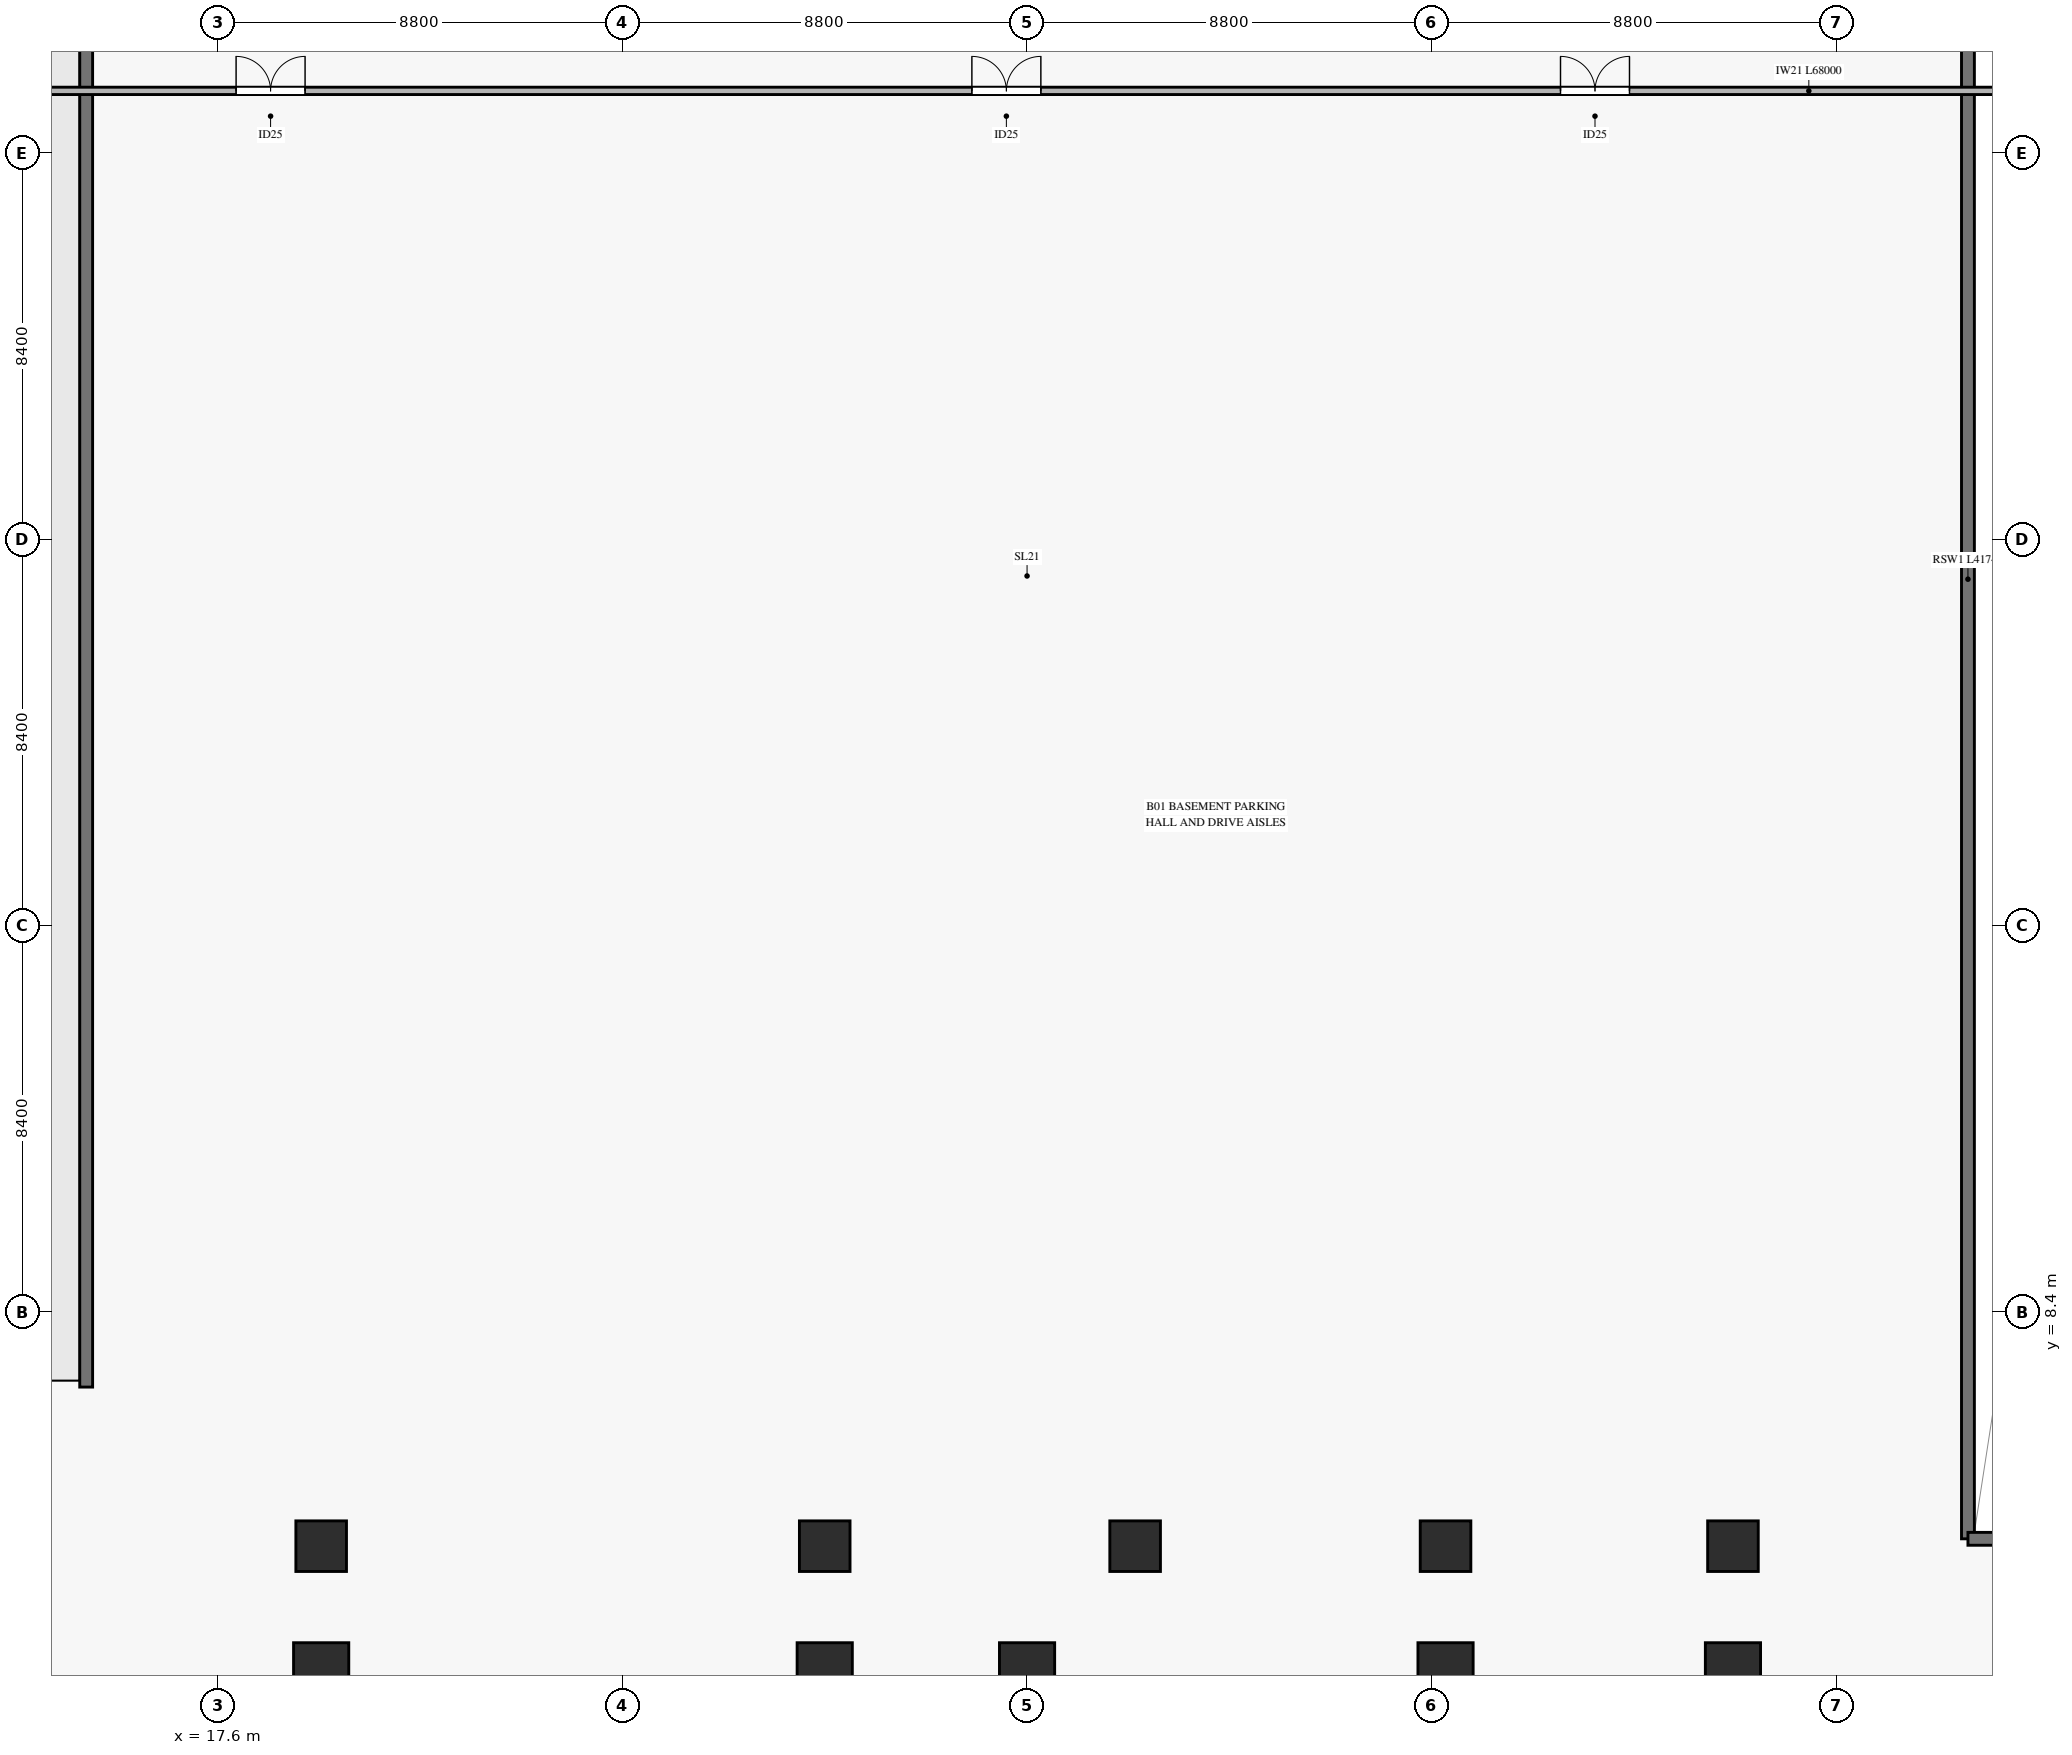
"""IFC4 building model, lengths in metres.
Left out: names, types, materials, properties, quantities, classifications, styles, units other than length and angle.
Written with IfcOpenShell. Run it as: python <this file> out.ifc"""

import sys

from ifc_helpers import new_model, si_unit, direction, frame, frame_2d, origin, origin_2d, place, context, subcontext, project, spatial, rectangle, hollow_rectangle, extrude, source, transform, mapped, element, fill, save


model = new_model("IFC4")
c1 = context("Model", 3, precision=1e-05, world=origin(), true_north=direction((0.0, 1.0)))
c2 = subcontext(c1, "Body", "Model", "MODEL_VIEW")
j1 = project(units=[si_unit("LENGTHUNIT", "METRE"), si_unit("PLANEANGLEUNIT", "RADIAN")], contexts=[c1])
p1 = place(None, origin())
s1 = spatial("IfcSite", under=j1, at=p1, CompositionType="ELEMENT")
p2 = place(p1, origin())
s2 = spatial("IfcBuilding", under=s1, at=p2, CompositionType="ELEMENT")
p3 = place(p2, frame((0.0, 0.0, -5.2)))
s3 = spatial("IfcBuildingStorey", under=s2, at=p3, CompositionType="ELEMENT", Elevation=-5.2)
m1 = source(origin(), c2, "Body", "SweptSolid", [
    extrude(hollow_rectangle(XDim=1.1, YDim=1.1, WallThickness=0.05, at=origin_2d()), origin(), (0.0, 0.0, 1.0), 4.94),
])
for number, where, z_axis, x_axis in (
    (1, (19.85, 3.3, 0.0), (0.0, 0.0, 1.0), (1.0, 0.0, 0.0)),
    (2, (30.8, 3.3, 0.0), (0.0, 0.0, 1.0), (1.0, 0.0, 0.0)),
    (3, (37.55, 3.3, 0.0), (0.0, 0.0, 1.0), (1.0, 0.0, 0.0)),
    (4, (44.3, 3.3, 0.0), (0.0, 0.0, 1.0), (1.0, 0.0, 0.0)),
    (5, (50.55, 3.3, 0.0), (0.0, 0.0, 1.0), (1.0, 0.0, 0.0)),
):
    element("IfcColumn", number, at=place(p3, frame(where, z_axis=z_axis, x_axis=x_axis)), inside=s3, PredefinedType="COLUMN", context=c2, shape_type="MappedRepresentation", body=[
        mapped(m1, transform((0.0, 0.0, 0.0), x_axis=(1.0, 0.0, 0.0), y_axis=(0.0, 1.0, 0.0), z_axis=(0.0, 0.0, 1.0), scale=1.0)),
    ])
m2 = source(origin(), c2, "Body", "SweptSolid", [
    extrude(hollow_rectangle(XDim=1.2, YDim=1.2, WallThickness=0.055, at=origin_2d()), origin(), (0.0, 0.0, 1.0), 4.94),
])
for number, where, z_axis, x_axis in (
    (6, (19.85, 0.6, 0.0), (0.0, 0.0, 1.0), (1.0, 0.0, 0.0)),
    (7, (30.8, 0.6, 0.0), (0.0, 0.0, 1.0), (1.0, 0.0, 0.0)),
    (8, (35.2, 0.6, 0.0), (0.0, 0.0, 1.0), (1.0, 0.0, 0.0)),
    (9, (44.3, 0.6, 0.0), (0.0, 0.0, 1.0), (1.0, 0.0, 0.0)),
    (10, (50.55, 0.6, 0.0), (0.0, 0.0, 1.0), (1.0, 0.0, 0.0)),
):
    element("IfcColumn", number, at=place(p3, frame(where, z_axis=z_axis, x_axis=x_axis)), inside=s3, PredefinedType="COLUMN", context=c2, shape_type="MappedRepresentation", body=[
        mapped(m2, transform((0.0, 0.0, 0.0), x_axis=(1.0, 0.0, 0.0), y_axis=(0.0, 1.0, 0.0), z_axis=(0.0, 0.0, 1.0), scale=1.0)),
    ])
p4 = place(p3, frame((55.66, 3.46, 0.0), z_axis=(0.0, 0.0, 1.0), x_axis=(0.0, 1.0, 0.0)))
e11 = element("IfcWall", 11, at=p4, inside=s3, PredefinedType="SOLIDWALL", context=c2, shape_type="SweptSolid", body=[
    extrude(rectangle(XDim=41.74, YDim=0.28, at=frame_2d((20.87, 0.0))), origin(), (0.0, 0.0, 1.0), 4.94),
])
p5 = place(p3, frame((55.66, 3.46, 0.0), z_axis=(0.0, 0.0, 1.0), x_axis=(1.0, 0.0, 0.0)))
e12 = element("IfcWall", 12, at=p5, inside=s3, PredefinedType="SOLIDWALL", context=c2, shape_type="SweptSolid", body=[
    extrude(rectangle(XDim=6.68, YDim=0.28, at=frame_2d((3.34, 0.0))), origin(), (0.0, 0.0, 1.0), 4.94),
])
p6 = place(p3, frame((14.74, 6.76, 0.0), z_axis=(0.0, 0.0, 1.0), x_axis=(0.0, 1.0, 0.0)))
e13 = element("IfcWall", 13, at=p6, inside=s3, PredefinedType="SOLIDWALL", context=c2, shape_type="SweptSolid", body=[
    extrude(rectangle(XDim=42.0, YDim=0.28, at=frame_2d((21.0, 0.0))), origin(), (0.0, 0.0, 1.0), 5.2),
])
p7 = place(p3, frame((1.2, 34.95, 0.0), z_axis=(0.0, 0.0, 1.0), x_axis=(1.0, 0.0, 0.0)))
e14 = element("IfcWall", 14, at=p7, inside=s3, PredefinedType="PARTITIONING", context=c2, shape_type="SweptSolid", body=[
    extrude(rectangle(XDim=68.0, YDim=0.16, at=frame_2d((34.0, 0.0))), origin(), (0.0, 0.0, 1.0), 3.825),
])
p8 = place(p7, frame((16.8, 0.0, 0.0)))
e15 = element("IfcOpeningElement", 15, at=p8, cuts=e14, PredefinedType="OPENING", context=c2, shape_type="SweptSolid", body=[
    extrude(rectangle(XDim=1.5, YDim=2.2, at=frame_2d((0.75, 1.1))), frame((0.0, 0.09, 0.0), z_axis=(0.0, -1.0, 0.0), x_axis=(1.0, 0.0, 0.0)), (0.0, 0.0, 1.0), 0.18),
])
p9 = place(p7, frame((32.8, 0.0, 0.0)))
e16 = element("IfcOpeningElement", 16, at=p9, cuts=e14, PredefinedType="OPENING", context=c2, shape_type="SweptSolid", body=[
    extrude(rectangle(XDim=1.5, YDim=2.2, at=frame_2d((0.75, 1.1))), frame((0.0, 0.09, 0.0), z_axis=(0.0, -1.0, 0.0), x_axis=(1.0, 0.0, 0.0)), (0.0, 0.0, 1.0), 0.18),
])
p10 = place(p7, frame((45.6, 0.0, 0.0)))
e17 = element("IfcOpeningElement", 17, at=p10, cuts=e14, PredefinedType="OPENING", context=c2, shape_type="SweptSolid", body=[
    extrude(rectangle(XDim=1.5, YDim=2.2, at=frame_2d((0.75, 1.1))), frame((0.0, 0.09, 0.0), z_axis=(0.0, -1.0, 0.0), x_axis=(1.0, 0.0, 0.0)), (0.0, 0.0, 1.0), 0.18),
])
p11 = place(p7, frame((2.5, 0.0, 0.0)))
e18 = element("IfcOpeningElement", 18, at=p11, cuts=e14, PredefinedType="OPENING", context=c2, shape_type="SweptSolid", body=[
    extrude(rectangle(XDim=1.5, YDim=2.2, at=frame_2d((0.75, 1.1))), frame((0.0, 0.09, 0.0), z_axis=(0.0, -1.0, 0.0), x_axis=(1.0, 0.0, 0.0)), (0.0, 0.0, 1.0), 0.18),
])
p12 = place(p7, frame((63.7, 0.0, 0.0)))
e19 = element("IfcOpeningElement", 19, at=p12, cuts=e14, PredefinedType="OPENING", context=c2, shape_type="SweptSolid", body=[
    extrude(rectangle(XDim=1.5, YDim=2.2, at=frame_2d((0.75, 1.1))), frame((0.0, 0.09, 0.0), z_axis=(0.0, -1.0, 0.0), x_axis=(1.0, 0.0, 0.0)), (0.0, 0.0, 1.0), 0.18),
])
m3 = source(origin(), c2, "Body", "SweptSolid", [
    extrude(rectangle(XDim=1.5, YDim=2.2, at=frame_2d((0.75, 1.1))), frame((0.0, 0.025, 0.0), z_axis=(0.0, -1.0, 0.0), x_axis=(1.0, 0.0, 0.0)), (0.0, 0.0, 1.0), 0.05),
])
p13 = place(p8, origin())
e20 = element("IfcDoor", 20, at=p13, inside=s3, OperationType="DOUBLE_SWING_LEFT", PredefinedType="DOOR", context=c2, shape_type="MappedRepresentation", body=[
    mapped(m3, transform((0.0, 0.0, 0.0), x_axis=(1.0, 0.0, 0.0), y_axis=(0.0, 1.0, 0.0), z_axis=(0.0, 0.0, 1.0), scale=1.0)),
])
fill(e15, e20)
p14 = place(p9, origin())
e21 = element("IfcDoor", 21, at=p14, inside=s3, OperationType="DOUBLE_SWING_LEFT", PredefinedType="DOOR", context=c2, shape_type="MappedRepresentation", body=[
    mapped(m3, transform((0.0, 0.0, 0.0), x_axis=(1.0, 0.0, 0.0), y_axis=(0.0, 1.0, 0.0), z_axis=(0.0, 0.0, 1.0), scale=1.0)),
])
fill(e16, e21)
p15 = place(p10, origin())
e22 = element("IfcDoor", 22, at=p15, inside=s3, OperationType="DOUBLE_SWING_LEFT", PredefinedType="DOOR", context=c2, shape_type="MappedRepresentation", body=[
    mapped(m3, transform((0.0, 0.0, 0.0), x_axis=(1.0, 0.0, 0.0), y_axis=(0.0, 1.0, 0.0), z_axis=(0.0, 0.0, 1.0), scale=1.0)),
])
fill(e17, e22)
save(model, sys.argv[1])
